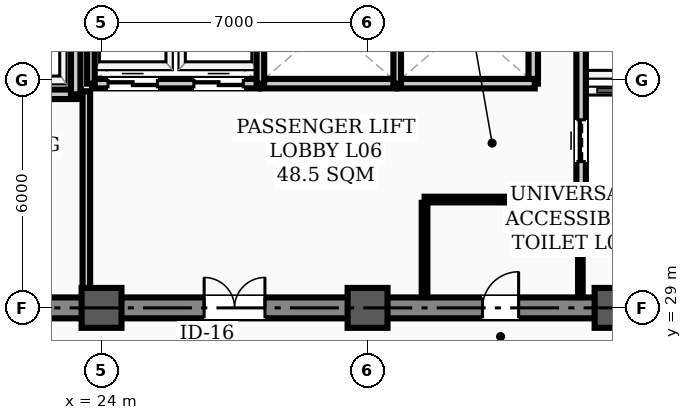
"""IFC4 building model, lengths in metres.
Left out: names, types, materials, properties, quantities, classifications, styles, units other than length and angle.
Written with IfcOpenShell. Run it as: python <this file> out.ifc"""

import sys

from ifc_helpers import new_model, si_unit, direction, frame, frame_2d, origin, origin_2d, place, context, subcontext, project, spatial, rectangle, hollow_rectangle, extrude, element, fill, save


model = new_model("IFC4")
c1 = context("Model", 3, precision=1e-05, world=origin(), true_north=direction((0.0, 1.0)))
c2 = subcontext(c1, "Body", "Model", "MODEL_VIEW")
j1 = project(units=[si_unit("LENGTHUNIT", "METRE"), si_unit("PLANEANGLEUNIT", "RADIAN")], contexts=[c1])
p1 = place(None, origin())
s1 = spatial("IfcSite", under=j1, at=p1, CompositionType="ELEMENT")
p2 = place(p1, origin())
s2 = spatial("IfcBuilding", under=s1, at=p2, CompositionType="ELEMENT")
p3 = place(p2, frame((0.0, 0.0, 26.5)))
s3 = spatial("IfcBuildingStorey", under=s2, at=p3, CompositionType="ELEMENT", Elevation=26.5)
for number, where, z_axis, x_axis in (
    (1, (24.0, 29.0, 0.0), (0.0, 0.0, 1.0), (1.0, 0.0, 0.0)),
    (2, (31.0, 29.0, 0.0), (0.0, 0.0, 1.0), (1.0, 0.0, 0.0)),
    (3, (37.5, 29.0, 0.0), (0.0, 0.0, 1.0), (1.0, 0.0, 0.0)),
):
    element("IfcColumn", number, at=place(p3, frame(where, z_axis=z_axis, x_axis=x_axis)), inside=s3, PredefinedType="COLUMN", context=c2, shape_type="SweptSolid", body=[
        extrude(hollow_rectangle(XDim=1.05, YDim=1.05, WallThickness=0.038, InnerFilletRadius=0.019, OuterFilletRadius=0.057, at=origin_2d()), origin(), (0.0, 0.0, 1.0), 3.9),
    ])
p4 = place(p3, frame((13.5, 29.0, 0.0), z_axis=(0.0, 0.0, 1.0), x_axis=(1.0, 0.0, 0.0)))
e4 = element("IfcWall", 4, at=p4, inside=s3, PredefinedType="SHEAR", context=c2, shape_type="SweptSolid", body=[
    extrude(rectangle(XDim=30.5, YDim=0.55, at=frame_2d((15.25, 0.0))), origin(), (0.0, 0.0, 1.0), 3.72),
])
p5 = place(p4, frame((1.75, 0.0, 0.0)))
e5 = element("IfcOpeningElement", 5, at=p5, cuts=e4, PredefinedType="OPENING", context=c2, shape_type="SweptSolid", body=[
    extrude(rectangle(XDim=1.1, YDim=2.08, at=frame_2d((0.55, 1.04))), frame((0.0, 0.285, 0.0), z_axis=(0.0, -1.0, 0.0), x_axis=(1.0, 0.0, 0.0)), (0.0, 0.0, 1.0), 0.57),
])
p6 = place(p4, frame((26.7, 0.0, 0.0)))
e6 = element("IfcOpeningElement", 6, at=p6, cuts=e4, PredefinedType="OPENING", context=c2, shape_type="SweptSolid", body=[
    extrude(rectangle(XDim=1.1, YDim=2.08, at=frame_2d((0.55, 1.04))), frame((0.0, 0.285, 0.0), z_axis=(0.0, -1.0, 0.0), x_axis=(1.0, 0.0, 0.0)), (0.0, 0.0, 1.0), 0.57),
])
p7 = place(p4, frame((6.8, 0.0, 0.0)))
e7 = element("IfcOpeningElement", 7, at=p7, cuts=e4, PredefinedType="OPENING", context=c2, shape_type="SweptSolid", body=[
    extrude(rectangle(XDim=1.1, YDim=2.08, at=frame_2d((0.55, 1.04))), frame((0.0, 0.285, 0.0), z_axis=(0.0, -1.0, 0.0), x_axis=(1.0, 0.0, 0.0)), (0.0, 0.0, 1.0), 0.57),
])
p8 = place(p4, frame((13.2, 0.0, 0.0)))
e8 = element("IfcOpeningElement", 8, at=p8, cuts=e4, PredefinedType="OPENING", context=c2, shape_type="SweptSolid", body=[
    extrude(rectangle(XDim=1.6, YDim=2.08, at=frame_2d((0.8, 1.04))), frame((0.0, 0.285, 0.0), z_axis=(0.0, -1.0, 0.0), x_axis=(1.0, 0.0, 0.0)), (0.0, 0.0, 1.0), 0.57),
])
p9 = place(p4, frame((20.525, 0.0, 0.0)))
e9 = element("IfcOpeningElement", 9, at=p9, cuts=e4, PredefinedType="OPENING", context=c2, shape_type="SweptSolid", body=[
    extrude(rectangle(XDim=0.95, YDim=2.08, at=frame_2d((0.475, 1.04))), frame((0.0, 0.285, 0.0), z_axis=(0.0, -1.0, 0.0), x_axis=(1.0, 0.0, 0.0)), (0.0, 0.0, 1.0), 0.57),
])
p10 = place(p3, frame((18.1, 34.62, 0.0), z_axis=(0.0, 0.0, 1.0), x_axis=(1.0, 0.0, 0.0)))
e10 = element("IfcWall", 10, at=p10, inside=s3, PredefinedType="STANDARD", context=c2, shape_type="SweptSolid", body=[
    extrude(rectangle(XDim=5.35, YDim=0.25, at=frame_2d((2.675, 0.0))), origin(), (0.0, 0.0, 1.0), 3.72),
])
p11 = place(p10, frame((0.85, 0.0, 0.0)))
e11 = element("IfcOpeningElement", 11, at=p11, cuts=e10, PredefinedType="OPENING", context=c2, shape_type="SweptSolid", body=[
    extrude(rectangle(XDim=1.1, YDim=2.08, at=frame_2d((0.55, 1.04))), frame((0.0, 0.135, 0.0), z_axis=(0.0, -1.0, 0.0), x_axis=(1.0, 0.0, 0.0)), (0.0, 0.0, 1.0), 0.27),
])
p12 = place(p10, frame((3.45, 0.0, 0.0)))
e12 = element("IfcOpeningElement", 12, at=p12, cuts=e10, PredefinedType="OPENING", context=c2, shape_type="SweptSolid", body=[
    extrude(rectangle(XDim=1.1, YDim=2.08, at=frame_2d((0.55, 1.04))), frame((0.0, 0.135, 0.0), z_axis=(0.0, -1.0, 0.0), x_axis=(1.0, 0.0, 0.0)), (0.0, 0.0, 1.0), 0.27),
])
p13 = place(p3, frame((36.62, 31.95, 0.0), z_axis=(0.0, 0.0, 1.0), x_axis=(0.0, 1.0, 0.0)))
e13 = element("IfcWall", 13, at=p13, inside=s3, PredefinedType="STANDARD", context=c2, shape_type="SweptSolid", body=[
    extrude(rectangle(XDim=6.0, YDim=0.25, at=frame_2d((3.0, 0.0))), origin(), (0.0, 0.0, 1.0), 3.3),
])
p14 = place(p13, frame((0.9, 0.0, 0.0)))
e14 = element("IfcOpeningElement", 14, at=p14, cuts=e13, PredefinedType="OPENING", context=c2, shape_type="SweptSolid", body=[
    extrude(rectangle(XDim=1.1, YDim=2.08, at=frame_2d((0.55, 1.04))), frame((0.0, 0.135, 0.0), z_axis=(0.0, -1.0, 0.0), x_axis=(1.0, 0.0, 0.0)), (0.0, 0.0, 1.0), 0.27),
])
p15 = place(p13, frame((4.0, 0.0, 0.0)))
e15 = element("IfcOpeningElement", 15, at=p15, cuts=e13, PredefinedType="OPENING", context=c2, shape_type="SweptSolid", body=[
    extrude(rectangle(XDim=1.1, YDim=2.08, at=frame_2d((0.55, 1.04))), frame((0.0, 0.135, 0.0), z_axis=(0.0, -1.0, 0.0), x_axis=(1.0, 0.0, 0.0)), (0.0, 0.0, 1.0), 0.27),
])
p16 = place(p3, frame((36.62, 31.95, 0.0), z_axis=(0.0, 0.0, 1.0), x_axis=(1.0, 0.0, 0.0)))
e16 = element("IfcWall", 16, at=p16, inside=s3, PredefinedType="STANDARD", context=c2, shape_type="SweptSolid", body=[
    extrude(rectangle(XDim=1.9, YDim=0.25, at=frame_2d((0.95, 0.0))), origin(), (0.0, 0.0, 1.0), 3.48),
])
p17 = place(p3, frame((23.32, 34.62, 0.0), z_axis=(0.0, 0.0, 1.0), x_axis=(0.0, 1.0, 0.0)))
e17 = element("IfcWall", 17, at=p17, inside=s3, PredefinedType="STANDARD", context=c2, shape_type="SweptSolid", body=[
    extrude(rectangle(XDim=3.33, YDim=0.25, at=frame_2d((1.665, 0.0))), origin(), (0.0, 0.0, 1.0), 3.3),
])
p18 = place(p3, frame((35.36, 34.9, 0.0), z_axis=(0.0, 0.0, 1.0), x_axis=(0.0, 1.0, 0.0)))
e18 = element("IfcWall", 18, at=p18, inside=s3, PredefinedType="STANDARD", context=c2, shape_type="SweptSolid", body=[
    extrude(rectangle(XDim=3.05, YDim=0.25, at=frame_2d((1.525, 0.0))), origin(), (0.0, 0.0, 1.0), 3.3),
])
p19 = place(p3, frame((23.75, 34.9, 0.0), z_axis=(0.0, 0.0, 1.0), x_axis=(1.0, 0.0, 0.0)))
e19 = element("IfcWall", 19, at=p19, inside=s3, PredefinedType="STANDARD", context=c2, shape_type="SweptSolid", body=[
    extrude(rectangle(XDim=4.4, YDim=0.25, at=frame_2d((2.2, 0.0))), origin(), (0.0, 0.0, 1.0), 3.72),
])
p20 = place(p19, frame((0.42, 0.0, 0.0)))
e20 = element("IfcOpeningElement", 20, at=p20, cuts=e19, PredefinedType="OPENING", context=c2, shape_type="SweptSolid", body=[
    extrude(rectangle(XDim=1.3, YDim=2.08, at=frame_2d((0.65, 1.04))), frame((0.0, 0.135, 0.0), z_axis=(0.0, -1.0, 0.0), x_axis=(1.0, 0.0, 0.0)), (0.0, 0.0, 1.0), 0.27),
])
p21 = place(p19, frame((2.68, 0.0, 0.0)))
e21 = element("IfcOpeningElement", 21, at=p21, cuts=e19, PredefinedType="OPENING", context=c2, shape_type="SweptSolid", body=[
    extrude(rectangle(XDim=1.3, YDim=2.08, at=frame_2d((0.65, 1.04))), frame((0.0, 0.135, 0.0), z_axis=(0.0, -1.0, 0.0), x_axis=(1.0, 0.0, 0.0)), (0.0, 0.0, 1.0), 0.27),
])
p22 = place(p3, frame((28.2, 34.9, 0.0), z_axis=(0.0, 0.0, 1.0), x_axis=(1.0, 0.0, 0.0)))
e22 = element("IfcWall", 22, at=p22, inside=s3, PredefinedType="STANDARD", context=c2, shape_type="SweptSolid", body=[
    extrude(rectangle(XDim=3.55, YDim=0.25, at=frame_2d((1.775, 0.0))), origin(), (0.0, 0.0, 1.0), 3.72),
])
p23 = place(p3, frame((31.8, 34.9, 0.0), z_axis=(0.0, 0.0, 1.0), x_axis=(1.0, 0.0, 0.0)))
e23 = element("IfcWall", 23, at=p23, inside=s3, PredefinedType="STANDARD", context=c2, shape_type="SweptSolid", body=[
    extrude(rectangle(XDim=3.6, YDim=0.25, at=frame_2d((1.8, 0.0))), origin(), (0.0, 0.0, 1.0), 3.72),
])
p24 = place(p3, frame((32.5, 31.85, 0.0), z_axis=(0.0, 0.0, 1.0), x_axis=(1.0, 0.0, 0.0)))
e24 = element("IfcWall", 24, at=p24, inside=s3, PredefinedType="PARTITIONING", context=c2, shape_type="SweptSolid", body=[
    extrude(rectangle(XDim=4.1, YDim=0.15, at=frame_2d((2.05, 0.0))), origin(), (0.0, 0.0, 1.0), 3.72),
])
p25 = place(p3, frame((23.6, 29.285, 0.0), z_axis=(0.0, 0.0, 1.0), x_axis=(0.0, 1.0, 0.0)))
e25 = element("IfcWall", 25, at=p25, inside=s3, PredefinedType="STANDARD", context=c2, shape_type="SweptSolid", body=[
    extrude(rectangle(XDim=5.415, YDim=0.2, at=frame_2d((2.708, 0.0))), origin(), (0.0, 0.0, 1.0), 3.1),
])
p26 = place(p3, frame((32.5, 29.285, 0.0), z_axis=(0.0, 0.0, 1.0), x_axis=(0.0, 1.0, 0.0)))
e26 = element("IfcWall", 26, at=p26, inside=s3, PredefinedType="PARTITIONING", context=c2, shape_type="SweptSolid", body=[
    extrude(rectangle(XDim=2.48, YDim=0.15, at=frame_2d((1.24, 0.0))), origin(), (0.0, 0.0, 1.0), 3.3),
])
p27 = place(p3, frame((36.6, 29.285, 0.0), z_axis=(0.0, 0.0, 1.0), x_axis=(0.0, 1.0, 0.0)))
e27 = element("IfcWall", 27, at=p27, inside=s3, PredefinedType="PARTITIONING", context=c2, shape_type="SweptSolid", body=[
    extrude(rectangle(XDim=2.48, YDim=0.12, at=frame_2d((1.24, 0.0))), origin(), (0.0, 0.0, 1.0), 3.3),
])
p28 = place(p3, frame((23.72, 34.9, 0.0), z_axis=(0.0, 0.0, 1.0), x_axis=(0.0, 1.0, 0.0)))
e28 = element("IfcWall", 28, at=p28, inside=s3, PredefinedType="STANDARD", context=c2, shape_type="SweptSolid", body=[
    extrude(rectangle(XDim=3.12, YDim=0.2, at=frame_2d((1.56, 0.0))), origin(), (0.0, 0.0, 1.0), 3.1),
])
for number, where, z_axis, x_axis in (
    (29, (28.18, 34.9, 0.0), (0.0, 0.0, 1.0), (0.0, 1.0, 0.0)),
    (30, (31.78, 34.9, 0.0), (0.0, 0.0, 1.0), (0.0, 1.0, 0.0)),
):
    element("IfcWall", number, at=place(p3, frame(where, z_axis=z_axis, x_axis=x_axis)), inside=s3, PredefinedType="STANDARD", context=c2, shape_type="SweptSolid", body=[
        extrude(rectangle(XDim=3.12, YDim=0.2, at=frame_2d((1.56, 0.0))), origin(), (0.0, 0.0, 1.0), 3.3),
    ])
p29 = place(p8, origin())
e31 = element("IfcDoor", 31, at=p29, inside=s3, OperationType="DOUBLE_DOOR_SINGLE_SWING", PredefinedType="DOOR", context=c2, shape_type="SweptSolid", body=[
    extrude(rectangle(XDim=1.6, YDim=2.08, at=frame_2d((0.8, 1.04))), frame((0.0, 0.025, 0.0), z_axis=(0.0, -1.0, 0.0), x_axis=(1.0, 0.0, 0.0)), (0.0, 0.0, 1.0), 0.05),
])
fill(e8, e31)
p30 = place(p9, origin())
e32 = element("IfcDoor", 32, at=p30, inside=s3, OperationType="SINGLE_SWING_RIGHT", PredefinedType="DOOR", context=c2, shape_type="SweptSolid", body=[
    extrude(rectangle(XDim=0.95, YDim=2.08, at=frame_2d((0.475, 1.04))), frame((0.0, 0.025, 0.0), z_axis=(0.0, -1.0, 0.0), x_axis=(1.0, 0.0, 0.0)), (0.0, 0.0, 1.0), 0.05),
])
fill(e9, e32)
p31 = place(p14, origin())
e33 = element("IfcDoor", 33, at=p31, inside=s3, OperationType="SLIDING_TO_LEFT", PredefinedType="DOOR", context=c2, shape_type="SweptSolid", body=[
    extrude(rectangle(XDim=1.1, YDim=2.08, at=frame_2d((0.55, 1.04))), frame((0.0, 0.025, 0.0), z_axis=(0.0, -1.0, 0.0), x_axis=(1.0, 0.0, 0.0)), (0.0, 0.0, 1.0), 0.05),
])
fill(e14, e33)
p32 = place(p20, origin())
e34 = element("IfcDoor", 34, at=p32, inside=s3, OperationType="DOUBLE_DOOR_SLIDING", PredefinedType="DOOR", context=c2, shape_type="SweptSolid", body=[
    extrude(rectangle(XDim=1.3, YDim=2.08, at=frame_2d((0.65, 1.04))), frame((0.0, 0.025, 0.0), z_axis=(0.0, -1.0, 0.0), x_axis=(1.0, 0.0, 0.0)), (0.0, 0.0, 1.0), 0.05),
])
fill(e20, e34)
p33 = place(p21, origin())
e35 = element("IfcDoor", 35, at=p33, inside=s3, OperationType="DOUBLE_DOOR_SLIDING", PredefinedType="DOOR", context=c2, shape_type="SweptSolid", body=[
    extrude(rectangle(XDim=1.3, YDim=2.08, at=frame_2d((0.65, 1.04))), frame((0.0, 0.025, 0.0), z_axis=(0.0, -1.0, 0.0), x_axis=(1.0, 0.0, 0.0)), (0.0, 0.0, 1.0), 0.05),
])
fill(e21, e35)
save(model, sys.argv[1])
